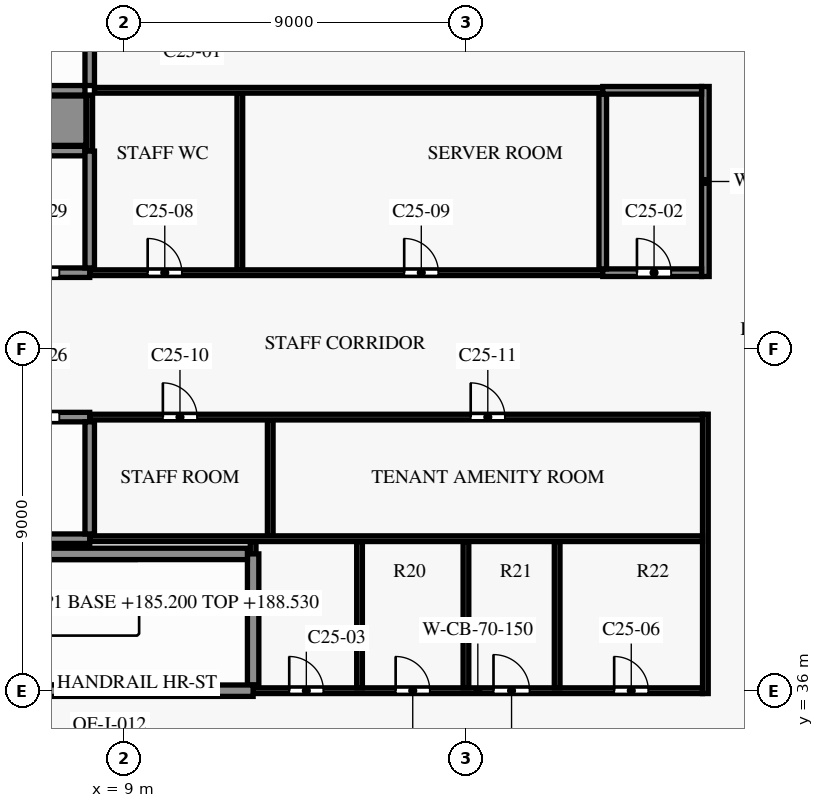
"""IFC4 building model, lengths in metres.
Left out: names, types, materials, properties, quantities, classifications, styles, units other than length and angle.
Written with IfcOpenShell. Run it as: python <this file> out.ifc"""

import sys

from ifc_helpers import new_model, si_unit, direction, frame, frame_2d, origin, place, context, subcontext, project, spatial, rectangle, extrude, element, fill, save


model = new_model("IFC4")
c1 = context("Model", 3, precision=1e-05, world=origin(), true_north=direction((0.0, 1.0)))
c2 = subcontext(c1, "Body", "Model", "MODEL_VIEW")
j1 = project(units=[si_unit("LENGTHUNIT", "METRE"), si_unit("PLANEANGLEUNIT", "RADIAN")], contexts=[c1])
p1 = place(None, origin())
s1 = spatial("IfcSite", under=j1, at=p1, CompositionType="ELEMENT")
p2 = place(p1, origin())
s2 = spatial("IfcBuilding", under=s1, at=p2, CompositionType="ELEMENT")
p3 = place(p2, frame((0.0, 0.0, 185.2)))
s3 = spatial("IfcBuildingStorey", under=s2, at=p3, CompositionType="ELEMENT", Elevation=185.2)
p4 = place(p3, frame((12.4, 36.0, 0.0), z_axis=(0.0, 0.0, 1.0), x_axis=(1.0, 0.0, 0.0)))
e1 = element("IfcWall", 1, at=p4, inside=s3, PredefinedType="SHEAR", context=c2, shape_type="SweptSolid", body=[
    extrude(rectangle(XDim=11.825, YDim=0.15, at=frame_2d((5.913, 0.0))), origin(), (0.0, 0.0, 1.0), 3.5),
])
p5 = place(p4, frame((0.95, 0.0, 0.0)))
e2 = element("IfcOpeningElement", 2, at=p5, cuts=e1, PredefinedType="OPENING", context=c2, shape_type="SweptSolid", body=[
    extrude(rectangle(XDim=0.9, YDim=2.1, at=frame_2d((0.45, 1.05))), frame((0.0, 0.085, 0.0), z_axis=(0.0, -1.0, 0.0), x_axis=(1.0, 0.0, 0.0)), (0.0, 0.0, 1.0), 0.17),
])
p6 = place(p4, frame((3.75, 0.0, 0.0)))
e3 = element("IfcOpeningElement", 3, at=p6, cuts=e1, PredefinedType="OPENING", context=c2, shape_type="SweptSolid", body=[
    extrude(rectangle(XDim=0.9, YDim=2.1, at=frame_2d((0.45, 1.05))), frame((0.0, 0.085, 0.0), z_axis=(0.0, -1.0, 0.0), x_axis=(1.0, 0.0, 0.0)), (0.0, 0.0, 1.0), 0.17),
])
p7 = place(p4, frame((6.325, 0.0, 0.0)))
e4 = element("IfcOpeningElement", 4, at=p7, cuts=e1, PredefinedType="OPENING", context=c2, shape_type="SweptSolid", body=[
    extrude(rectangle(XDim=0.95, YDim=2.1, at=frame_2d((0.475, 1.05))), frame((0.0, 0.085, 0.0), z_axis=(0.0, -1.0, 0.0), x_axis=(1.0, 0.0, 0.0)), (0.0, 0.0, 1.0), 0.17),
])
p8 = place(p4, frame((9.5, 0.0, 0.0)))
e5 = element("IfcOpeningElement", 5, at=p8, cuts=e1, PredefinedType="OPENING", context=c2, shape_type="SweptSolid", body=[
    extrude(rectangle(XDim=0.9, YDim=2.1, at=frame_2d((0.45, 1.05))), frame((0.0, 0.085, 0.0), z_axis=(0.0, -1.0, 0.0), x_axis=(1.0, 0.0, 0.0)), (0.0, 0.0, 1.0), 0.17),
])
p9 = place(p3, frame((4.4, 36.0, 0.0), z_axis=(0.0, 0.0, 1.0), x_axis=(1.0, 0.0, 0.0)))
e6 = element("IfcWall", 6, at=p9, inside=s3, PredefinedType="SHEAR", context=c2, shape_type="SweptSolid", body=[
    extrude(rectangle(XDim=8.0, YDim=0.3, at=frame_2d((4.0, 0.0))), origin(), (0.0, 0.0, 1.0), 3.5),
])
p10 = place(p9, frame((0.3, 0.0, 0.0)))
e7 = element("IfcOpeningElement", 7, at=p10, cuts=e6, PredefinedType="OPENING", context=c2, shape_type="SweptSolid", body=[
    extrude(rectangle(XDim=1.5, YDim=2.2, at=frame_2d((0.75, 1.1))), frame((0.0, 0.16, 0.0), z_axis=(0.0, -1.0, 0.0), x_axis=(1.0, 0.0, 0.0)), (0.0, 0.0, 1.0), 0.32),
])
p11 = place(p3, frame((4.55, 39.6, 0.0), z_axis=(0.0, 0.0, 1.0), x_axis=(1.0, 0.0, 0.0)))
e8 = element("IfcWall", 8, at=p11, inside=s3, PredefinedType="SHEAR", context=c2, shape_type="SweptSolid", body=[
    extrude(rectangle(XDim=7.7, YDim=0.3, at=frame_2d((3.85, 0.0))), origin(), (0.0, 0.0, 1.0), 3.5),
])
p12 = place(p3, frame((8.1, 40.0, 0.0), z_axis=(0.0, 0.0, 1.0), x_axis=(1.0, 0.0, 0.0)))
e9 = element("IfcWall", 9, at=p12, inside=s3, PredefinedType="PARTITIONING", context=c2, shape_type="SweptSolid", body=[
    extrude(rectangle(XDim=16.125, YDim=0.15, at=frame_2d((8.062, 0.0))), origin(), (0.0, 0.0, 1.0), 3.5),
])
p13 = place(p3, frame((0.15, 40.0, 0.0), z_axis=(0.0, 0.0, 1.0), x_axis=(1.0, 0.0, 0.0)))
e10 = element("IfcWall", 10, at=p13, inside=s3, PredefinedType="SHEAR", context=c2, shape_type="SweptSolid", body=[
    extrude(rectangle(XDim=7.95, YDim=0.25, at=frame_2d((3.975, 0.0))), origin(), (0.0, 0.0, 1.0), 3.5),
])
p14 = place(p3, frame((8.1, 43.2, 0.0), z_axis=(0.0, 0.0, 1.0), x_axis=(1.0, 0.0, 0.0)))
e11 = element("IfcWall", 11, at=p14, inside=s3, PredefinedType="PARTITIONING", context=c2, shape_type="SweptSolid", body=[
    extrude(rectangle(XDim=16.125, YDim=0.15, at=frame_2d((8.062, 0.0))), origin(), (0.0, 0.0, 1.0), 3.5),
])
p15 = place(p14, frame((1.925, 0.0, 0.0)))
e12 = element("IfcOpeningElement", 12, at=p15, cuts=e11, PredefinedType="OPENING", context=c2, shape_type="SweptSolid", body=[
    extrude(rectangle(XDim=0.9, YDim=2.1, at=frame_2d((0.45, 1.05))), frame((0.0, 0.085, 0.0), z_axis=(0.0, -1.0, 0.0), x_axis=(1.0, 0.0, 0.0)), (0.0, 0.0, 1.0), 0.17),
])
p16 = place(p14, frame((10.025, 0.0, 0.0)))
e13 = element("IfcOpeningElement", 13, at=p16, cuts=e11, PredefinedType="OPENING", context=c2, shape_type="SweptSolid", body=[
    extrude(rectangle(XDim=0.9, YDim=2.1, at=frame_2d((0.45, 1.05))), frame((0.0, 0.085, 0.0), z_axis=(0.0, -1.0, 0.0), x_axis=(1.0, 0.0, 0.0)), (0.0, 0.0, 1.0), 0.17),
])
p17 = place(p3, frame((0.125, 43.2, 0.0), z_axis=(0.0, 0.0, 1.0), x_axis=(1.0, 0.0, 0.0)))
e14 = element("IfcWall", 14, at=p17, inside=s3, PredefinedType="SHEAR", context=c2, shape_type="SweptSolid", body=[
    extrude(rectangle(XDim=7.975, YDim=0.25, at=frame_2d((3.988, 0.0))), origin(), (0.0, 0.0, 1.0), 3.5),
])
p18 = place(p17, frame((0.675, 0.0, 0.0)))
e15 = element("IfcOpeningElement", 15, at=p18, cuts=e14, PredefinedType="OPENING", context=c2, shape_type="SweptSolid", body=[
    extrude(rectangle(XDim=1.1, YDim=2.1, at=frame_2d((0.55, 1.05))), frame((0.0, 0.135, 0.0), z_axis=(0.0, -1.0, 0.0), x_axis=(1.0, 0.0, 0.0)), (0.0, 0.0, 1.0), 0.27),
])
p19 = place(p17, frame((3.375, 0.0, 0.0)))
e16 = element("IfcOpeningElement", 16, at=p19, cuts=e14, PredefinedType="OPENING", context=c2, shape_type="SweptSolid", body=[
    extrude(rectangle(XDim=1.1, YDim=2.1, at=frame_2d((0.55, 1.05))), frame((0.0, 0.135, 0.0), z_axis=(0.0, -1.0, 0.0), x_axis=(1.0, 0.0, 0.0)), (0.0, 0.0, 1.0), 0.27),
])
p20 = place(p17, frame((6.075, 0.0, 0.0)))
e17 = element("IfcOpeningElement", 17, at=p20, cuts=e14, PredefinedType="OPENING", context=c2, shape_type="SweptSolid", body=[
    extrude(rectangle(XDim=1.1, YDim=2.1, at=frame_2d((0.55, 1.05))), frame((0.0, 0.135, 0.0), z_axis=(0.0, -1.0, 0.0), x_axis=(1.0, 0.0, 0.0)), (0.0, 0.0, 1.0), 0.27),
])
p21 = place(p3, frame((8.1, 47.0, 0.0), z_axis=(0.0, 0.0, 1.0), x_axis=(1.0, 0.0, 0.0)))
e18 = element("IfcWall", 18, at=p21, inside=s3, PredefinedType="PARTITIONING", context=c2, shape_type="SweptSolid", body=[
    extrude(rectangle(XDim=13.5, YDim=0.15, at=frame_2d((6.75, 0.0))), origin(), (0.0, 0.0, 1.0), 3.5),
])
p22 = place(p21, frame((1.525, 0.0, 0.0)))
e19 = element("IfcOpeningElement", 19, at=p22, cuts=e18, PredefinedType="OPENING", context=c2, shape_type="SweptSolid", body=[
    extrude(rectangle(XDim=0.9, YDim=2.1, at=frame_2d((0.45, 1.05))), frame((0.0, 0.085, 0.0), z_axis=(0.0, -1.0, 0.0), x_axis=(1.0, 0.0, 0.0)), (0.0, 0.0, 1.0), 0.17),
])
p23 = place(p21, frame((8.275, 0.0, 0.0)))
e20 = element("IfcOpeningElement", 20, at=p23, cuts=e18, PredefinedType="OPENING", context=c2, shape_type="SweptSolid", body=[
    extrude(rectangle(XDim=0.9, YDim=2.1, at=frame_2d((0.45, 1.05))), frame((0.0, 0.085, 0.0), z_axis=(0.0, -1.0, 0.0), x_axis=(1.0, 0.0, 0.0)), (0.0, 0.0, 1.0), 0.17),
])
p24 = place(p3, frame((21.6, 47.0, 0.0), z_axis=(0.0, 0.0, 1.0), x_axis=(1.0, 0.0, 0.0)))
e21 = element("IfcWall", 21, at=p24, inside=s3, PredefinedType="PARTITIONING", context=c2, shape_type="SweptSolid", body=[
    extrude(rectangle(XDim=2.6, YDim=0.2, at=frame_2d((1.3, 0.0))), origin(), (0.0, 0.0, 1.0), 3.5),
])
p25 = place(p24, frame((0.9, 0.0, 0.0)))
e22 = element("IfcOpeningElement", 22, at=p25, cuts=e21, PredefinedType="OPENING", context=c2, shape_type="SweptSolid", body=[
    extrude(rectangle(XDim=0.9, YDim=2.1, at=frame_2d((0.45, 1.05))), frame((0.0, 0.11, 0.0), z_axis=(0.0, -1.0, 0.0), x_axis=(1.0, 0.0, 0.0)), (0.0, 0.0, 1.0), 0.22),
])
p26 = place(p3, frame((0.125, 47.0, 0.0), z_axis=(0.0, 0.0, 1.0), x_axis=(1.0, 0.0, 0.0)))
e23 = element("IfcWall", 23, at=p26, inside=s3, PredefinedType="SHEAR", context=c2, shape_type="SweptSolid", body=[
    extrude(rectangle(XDim=7.975, YDim=0.25, at=frame_2d((3.988, 0.0))), origin(), (0.0, 0.0, 1.0), 3.5),
])
p27 = place(p26, frame((0.675, 0.0, 0.0)))
e24 = element("IfcOpeningElement", 24, at=p27, cuts=e23, PredefinedType="OPENING", context=c2, shape_type="SweptSolid", body=[
    extrude(rectangle(XDim=1.1, YDim=2.1, at=frame_2d((0.55, 1.05))), frame((0.0, 0.135, 0.0), z_axis=(0.0, -1.0, 0.0), x_axis=(1.0, 0.0, 0.0)), (0.0, 0.0, 1.0), 0.27),
])
p28 = place(p26, frame((3.375, 0.0, 0.0)))
e25 = element("IfcOpeningElement", 25, at=p28, cuts=e23, PredefinedType="OPENING", context=c2, shape_type="SweptSolid", body=[
    extrude(rectangle(XDim=1.1, YDim=2.1, at=frame_2d((0.55, 1.05))), frame((0.0, 0.135, 0.0), z_axis=(0.0, -1.0, 0.0), x_axis=(1.0, 0.0, 0.0)), (0.0, 0.0, 1.0), 0.27),
])
p29 = place(p26, frame((6.075, 0.0, 0.0)))
e26 = element("IfcOpeningElement", 26, at=p29, cuts=e23, PredefinedType="OPENING", context=c2, shape_type="SweptSolid", body=[
    extrude(rectangle(XDim=1.1, YDim=2.1, at=frame_2d((0.55, 1.05))), frame((0.0, 0.135, 0.0), z_axis=(0.0, -1.0, 0.0), x_axis=(1.0, 0.0, 0.0)), (0.0, 0.0, 1.0), 0.27),
])
p30 = place(p3, frame((0.125, 50.2, 0.0), z_axis=(0.0, 0.0, 1.0), x_axis=(1.0, 0.0, 0.0)))
e27 = element("IfcWall", 27, at=p30, inside=s3, PredefinedType="SHEAR", context=c2, shape_type="SweptSolid", body=[
    extrude(rectangle(XDim=7.85, YDim=0.25, at=frame_2d((3.925, 0.0))), origin(), (0.0, 0.0, 1.0), 3.5),
])
p31 = place(p3, frame((-0.125, 51.0, 0.0), z_axis=(0.0, 0.0, 1.0), x_axis=(1.0, 0.0, 0.0)))
e28 = element("IfcWall", 28, at=p31, inside=s3, PredefinedType="SHEAR", context=c2, shape_type="SweptSolid", body=[
    extrude(rectangle(XDim=8.125, YDim=1.3, at=frame_2d((4.062, 0.0))), origin(), (0.0, 0.0, 1.0), 3.5),
])
p32 = place(p3, frame((8.225, 51.8, 0.0), z_axis=(0.0, 0.0, 1.0), x_axis=(1.0, 0.0, 0.0)))
e29 = element("IfcWall", 29, at=p32, inside=s3, PredefinedType="PARTITIONING", context=c2, shape_type="SweptSolid", body=[
    extrude(rectangle(XDim=13.375, YDim=0.15, at=frame_2d((6.688, 0.0))), origin(), (0.0, 0.0, 1.0), 3.5),
])
p33 = place(p3, frame((21.6, 51.8, 0.0), z_axis=(0.0, 0.0, 1.0), x_axis=(1.0, 0.0, 0.0)))
e30 = element("IfcWall", 30, at=p33, inside=s3, PredefinedType="PARTITIONING", context=c2, shape_type="SweptSolid", body=[
    extrude(rectangle(XDim=2.6, YDim=0.2, at=frame_2d((1.3, 0.0))), origin(), (0.0, 0.0, 1.0), 3.5),
])
p34 = place(p3, frame((0.125, 51.8, 0.0), z_axis=(0.0, 0.0, 1.0), x_axis=(1.0, 0.0, 0.0)))
e31 = element("IfcWall", 31, at=p34, inside=s3, PredefinedType="SHEAR", context=c2, shape_type="SweptSolid", body=[
    extrude(rectangle(XDim=7.85, YDim=0.25, at=frame_2d((3.925, 0.0))), origin(), (0.0, 0.0, 1.0), 3.5),
])
p35 = place(p3, frame((8.1, 50.2, 0.0), z_axis=(0.0, 0.0, 1.0), x_axis=(0.0, 1.0, 0.0)))
e32 = element("IfcWall", 32, at=p35, inside=s3, PredefinedType="PARTITIONING", context=c2, shape_type="SweptSolid", body=[
    extrude(rectangle(XDim=1.475, YDim=0.15, at=frame_2d((0.738, 0.0))), origin(), (0.0, 0.0, 1.0), 3.5),
])
p36 = place(p3, frame((8.1, 40.125, 0.0), z_axis=(0.0, 0.0, 1.0), x_axis=(0.0, 1.0, 0.0)))
e33 = element("IfcWall", 33, at=p36, inside=s3, PredefinedType="SHEAR", context=c2, shape_type="SweptSolid", body=[
    extrude(rectangle(XDim=2.95, YDim=0.25, at=frame_2d((1.475, 0.0))), origin(), (0.0, 0.0, 1.0), 3.5),
])
p37 = place(p3, frame((8.1, 47.125, 0.0), z_axis=(0.0, 0.0, 1.0), x_axis=(0.0, 1.0, 0.0)))
e34 = element("IfcWall", 34, at=p37, inside=s3, PredefinedType="SHEAR", context=c2, shape_type="SweptSolid", body=[
    extrude(rectangle(XDim=3.075, YDim=0.25, at=frame_2d((1.538, 0.0))), origin(), (0.0, 0.0, 1.0), 3.5),
])
p38 = place(p3, frame((8.1, 51.925, 0.0), z_axis=(0.0, 0.0, 1.0), x_axis=(0.0, 1.0, 0.0)))
e35 = element("IfcWall", 35, at=p38, inside=s3, PredefinedType="SHEAR", context=c2, shape_type="SweptSolid", body=[
    extrude(rectangle(XDim=2.95, YDim=0.25, at=frame_2d((1.475, 0.0))), origin(), (0.0, 0.0, 1.0), 3.5),
])
p39 = place(p3, frame((12.05, 47.075, 0.0), z_axis=(0.0, 0.0, 1.0), x_axis=(0.0, 1.0, 0.0)))
e36 = element("IfcWall", 36, at=p39, inside=s3, PredefinedType="PARTITIONING", context=c2, shape_type="SweptSolid", body=[
    extrude(rectangle(XDim=4.65, YDim=0.15, at=frame_2d((2.325, 0.0))), origin(), (0.0, 0.0, 1.0), 3.5),
])
p40 = place(p3, frame((12.4, 39.6, 0.0), z_axis=(0.0, 0.0, 1.0), x_axis=(0.0, 1.0, 0.0)))
e37 = element("IfcWall", 37, at=p40, inside=s3, PredefinedType="PARTITIONING", context=c2, shape_type="SweptSolid", body=[
    extrude(rectangle(XDim=0.325, YDim=0.15, at=frame_2d((0.163, 0.0))), origin(), (0.0, 0.0, 1.0), 3.5),
])
p41 = place(p3, frame((12.4, 36.15, 0.0), z_axis=(0.0, 0.0, 1.0), x_axis=(0.0, 1.0, 0.0)))
e38 = element("IfcWall", 38, at=p41, inside=s3, PredefinedType="SHEAR", context=c2, shape_type="SweptSolid", body=[
    extrude(rectangle(XDim=3.45, YDim=0.3, at=frame_2d((1.725, 0.0))), origin(), (0.0, 0.0, 1.0), 3.5),
])
p42 = place(p3, frame((12.85, 40.075, 0.0), z_axis=(0.0, 0.0, 1.0), x_axis=(0.0, 1.0, 0.0)))
e39 = element("IfcWall", 39, at=p42, inside=s3, PredefinedType="PARTITIONING", context=c2, shape_type="SweptSolid", body=[
    extrude(rectangle(XDim=3.05, YDim=0.15, at=frame_2d((1.525, 0.0))), origin(), (0.0, 0.0, 1.0), 3.5),
])
for number, where, z_axis, x_axis in (
    (40, (15.2, 36.075, 0.0), (0.0, 0.0, 1.0), (0.0, 1.0, 0.0)),
    (41, (18.0, 36.075, 0.0), (0.0, 0.0, 1.0), (0.0, 1.0, 0.0)),
    (42, (20.4, 36.075, 0.0), (0.0, 0.0, 1.0), (0.0, 1.0, 0.0)),
):
    element("IfcWall", number, at=place(p3, frame(where, z_axis=z_axis, x_axis=x_axis)), inside=s3, PredefinedType="PARTITIONING", context=c2, shape_type="SweptSolid", body=[
        extrude(rectangle(XDim=3.85, YDim=0.15, at=frame_2d((1.925, 0.0))), origin(), (0.0, 0.0, 1.0), 3.5),
    ])
p43 = place(p3, frame((21.6, 47.1, 0.0), z_axis=(0.0, 0.0, 1.0), x_axis=(0.0, 1.0, 0.0)))
e43 = element("IfcWall", 43, at=p43, inside=s3, PredefinedType="PARTITIONING", context=c2, shape_type="SweptSolid", body=[
    extrude(rectangle(XDim=4.6, YDim=0.2, at=frame_2d((2.3, 0.0))), origin(), (0.0, 0.0, 1.0), 3.5),
])
p44 = place(p3, frame((24.3, 35.925, 0.0), z_axis=(0.0, 0.0, 1.0), x_axis=(0.0, 1.0, 0.0)))
e44 = element("IfcWall", 44, at=p44, inside=s3, PredefinedType="PARTITIONING", context=c2, shape_type="SweptSolid", body=[
    extrude(rectangle(XDim=7.35, YDim=0.15, at=frame_2d((3.675, 0.0))), origin(), (0.0, 0.0, 1.0), 3.5),
])
p45 = place(p3, frame((24.3, 46.9, 0.0), z_axis=(0.0, 0.0, 1.0), x_axis=(0.0, 1.0, 0.0)))
e45 = element("IfcWall", 45, at=p45, inside=s3, PredefinedType="SHEAR", context=c2, shape_type="SweptSolid", body=[
    extrude(rectangle(XDim=5.0, YDim=0.2, at=frame_2d((2.5, 0.0))), origin(), (0.0, 0.0, 1.0), 3.5),
])
p46 = place(p25, origin())
e46 = element("IfcDoor", 46, at=p46, inside=s3, OperationType="SINGLE_SWING_LEFT", PredefinedType="DOOR", context=c2, shape_type="SweptSolid", body=[
    extrude(rectangle(XDim=0.9, YDim=2.1, at=frame_2d((0.45, 1.05))), frame((0.0, 0.025, 0.0), z_axis=(0.0, -1.0, 0.0), x_axis=(1.0, 0.0, 0.0)), (0.0, 0.0, 1.0), 0.05),
])
fill(e22, e46)
p47 = place(p5, origin())
e47 = element("IfcDoor", 47, at=p47, inside=s3, OperationType="SINGLE_SWING_RIGHT", PredefinedType="DOOR", context=c2, shape_type="SweptSolid", body=[
    extrude(rectangle(XDim=0.9, YDim=2.1, at=frame_2d((0.45, 1.05))), frame((0.0, 0.025, 0.0), z_axis=(0.0, -1.0, 0.0), x_axis=(1.0, 0.0, 0.0)), (0.0, 0.0, 1.0), 0.05),
])
fill(e2, e47)
p48 = place(p6, origin())
e48 = element("IfcDoor", 48, at=p48, inside=s3, OperationType="SINGLE_SWING_LEFT", PredefinedType="DOOR", context=c2, shape_type="SweptSolid", body=[
    extrude(rectangle(XDim=0.9, YDim=2.1, at=frame_2d((0.45, 1.05))), frame((0.0, 0.025, 0.0), z_axis=(0.0, -1.0, 0.0), x_axis=(1.0, 0.0, 0.0)), (0.0, 0.0, 1.0), 0.05),
])
fill(e3, e48)
p49 = place(p7, origin())
e49 = element("IfcDoor", 49, at=p49, inside=s3, OperationType="SINGLE_SWING_RIGHT", PredefinedType="DOOR", context=c2, shape_type="SweptSolid", body=[
    extrude(rectangle(XDim=0.95, YDim=2.1, at=frame_2d((0.475, 1.05))), frame((0.0, 0.025, 0.0), z_axis=(0.0, -1.0, 0.0), x_axis=(1.0, 0.0, 0.0)), (0.0, 0.0, 1.0), 0.05),
])
fill(e4, e49)
p50 = place(p8, origin())
e50 = element("IfcDoor", 50, at=p50, inside=s3, OperationType="SINGLE_SWING_LEFT", PredefinedType="DOOR", context=c2, shape_type="SweptSolid", body=[
    extrude(rectangle(XDim=0.9, YDim=2.1, at=frame_2d((0.45, 1.05))), frame((0.0, 0.025, 0.0), z_axis=(0.0, -1.0, 0.0), x_axis=(1.0, 0.0, 0.0)), (0.0, 0.0, 1.0), 0.05),
])
fill(e5, e50)
p51 = place(p22, origin())
e51 = element("IfcDoor", 51, at=p51, inside=s3, OperationType="SINGLE_SWING_LEFT", PredefinedType="DOOR", context=c2, shape_type="SweptSolid", body=[
    extrude(rectangle(XDim=0.9, YDim=2.1, at=frame_2d((0.45, 1.05))), frame((0.0, 0.025, 0.0), z_axis=(0.0, -1.0, 0.0), x_axis=(1.0, 0.0, 0.0)), (0.0, 0.0, 1.0), 0.05),
])
fill(e19, e51)
p52 = place(p23, origin())
e52 = element("IfcDoor", 52, at=p52, inside=s3, OperationType="SINGLE_SWING_RIGHT", PredefinedType="DOOR", context=c2, shape_type="SweptSolid", body=[
    extrude(rectangle(XDim=0.9, YDim=2.1, at=frame_2d((0.45, 1.05))), frame((0.0, 0.025, 0.0), z_axis=(0.0, -1.0, 0.0), x_axis=(1.0, 0.0, 0.0)), (0.0, 0.0, 1.0), 0.05),
])
fill(e20, e52)
p53 = place(p15, origin())
e53 = element("IfcDoor", 53, at=p53, inside=s3, OperationType="SINGLE_SWING_RIGHT", PredefinedType="DOOR", context=c2, shape_type="SweptSolid", body=[
    extrude(rectangle(XDim=0.9, YDim=2.1, at=frame_2d((0.45, 1.05))), frame((0.0, 0.025, 0.0), z_axis=(0.0, -1.0, 0.0), x_axis=(1.0, 0.0, 0.0)), (0.0, 0.0, 1.0), 0.05),
])
fill(e12, e53)
p54 = place(p16, origin())
e54 = element("IfcDoor", 54, at=p54, inside=s3, OperationType="SINGLE_SWING_LEFT", PredefinedType="DOOR", context=c2, shape_type="SweptSolid", body=[
    extrude(rectangle(XDim=0.9, YDim=2.1, at=frame_2d((0.45, 1.05))), frame((0.0, 0.025, 0.0), z_axis=(0.0, -1.0, 0.0), x_axis=(1.0, 0.0, 0.0)), (0.0, 0.0, 1.0), 0.05),
])
fill(e13, e54)
p55 = place(p20, origin())
e55 = element("IfcDoor", 55, at=p55, inside=s3, OperationType="DOUBLE_DOOR_SLIDING", PredefinedType="DOOR", context=c2, shape_type="SweptSolid", body=[
    extrude(rectangle(XDim=1.1, YDim=2.1, at=frame_2d((0.55, 1.05))), frame((0.0, 0.025, 0.0), z_axis=(0.0, -1.0, 0.0), x_axis=(1.0, 0.0, 0.0)), (0.0, 0.0, 1.0), 0.05),
])
fill(e17, e55)
p56 = place(p29, origin())
e56 = element("IfcDoor", 56, at=p56, inside=s3, OperationType="DOUBLE_DOOR_SLIDING", PredefinedType="DOOR", context=c2, shape_type="SweptSolid", body=[
    extrude(rectangle(XDim=1.1, YDim=2.1, at=frame_2d((0.55, 1.05))), frame((0.0, 0.025, 0.0), z_axis=(0.0, -1.0, 0.0), x_axis=(1.0, 0.0, 0.0)), (0.0, 0.0, 1.0), 0.05),
])
fill(e26, e56)
save(model, sys.argv[1])
